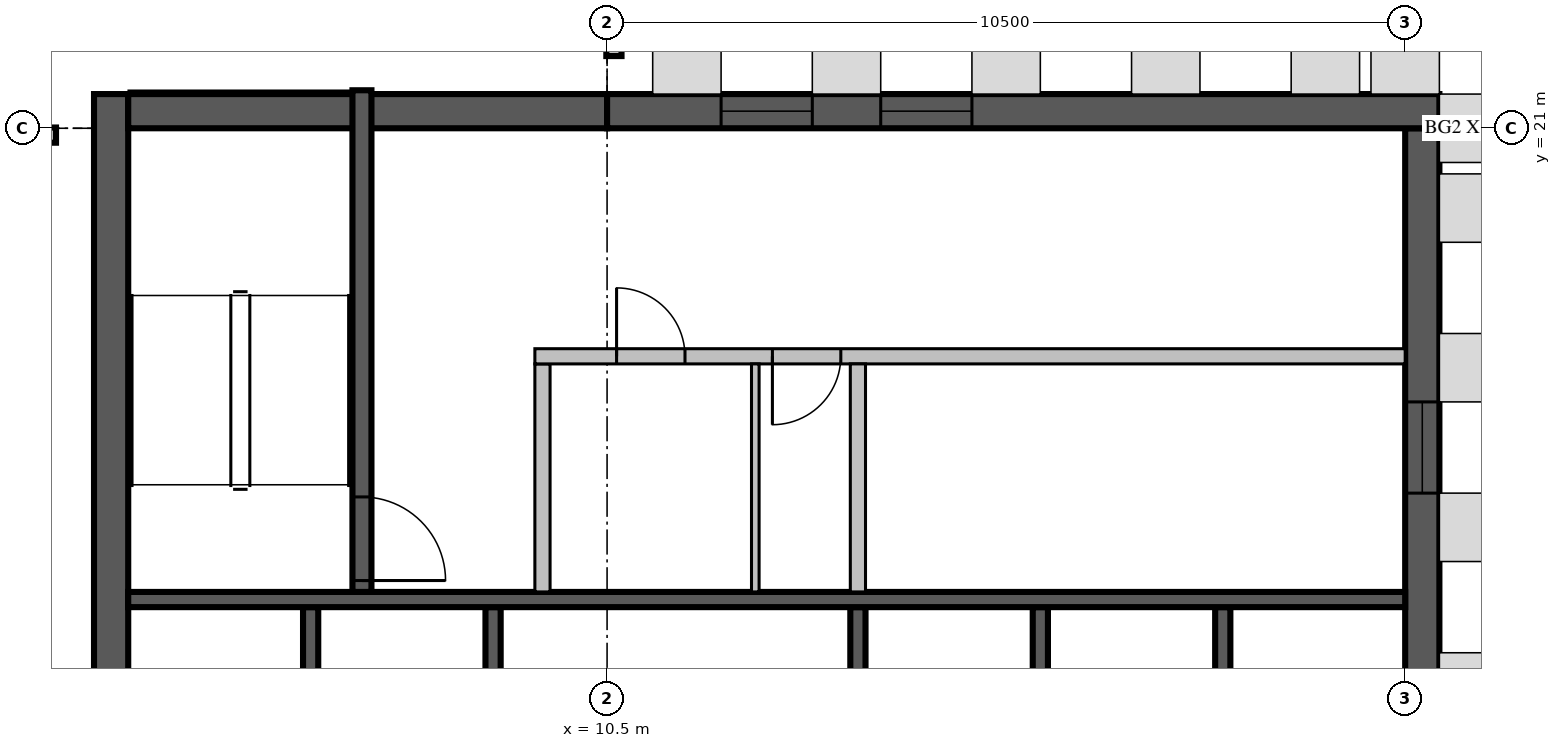
"""IFC4 building model, lengths in metres.
Left out: names, types, materials, properties, quantities, classifications, styles, units other than length and angle.
Written with IfcOpenShell. Run it as: python <this file> out.ifc"""

import sys

from ifc_helpers import new_model, si_unit, direction, frame, frame_2d, origin, place, context, subcontext, project, spatial, rectangle, extrude, source, transform, mapped, element, fill, save


model = new_model("IFC4")
c1 = context("Model", 3, precision=1e-05, world=origin(), true_north=direction((0.0, 1.0)))
c2 = subcontext(c1, "Body", "Model", "MODEL_VIEW")
j1 = project(units=[si_unit("LENGTHUNIT", "METRE"), si_unit("PLANEANGLEUNIT", "RADIAN")], contexts=[c1])
p1 = place(None, origin())
s1 = spatial("IfcSite", under=j1, at=p1, CompositionType="ELEMENT")
p2 = place(p1, origin())
s2 = spatial("IfcBuilding", under=s1, at=p2, CompositionType="ELEMENT")
p3 = place(p2, frame((0.0, 0.0, 368.5)))
s3 = spatial("IfcBuildingStorey", under=s2, at=p3, CompositionType="ELEMENT", Elevation=368.5)
p4 = place(p3, frame((3.975, 4.2, 0.0), z_axis=(0.0, 0.0, 1.0), x_axis=(0.0, 1.0, 0.0)))
e1 = element("IfcWall", 1, at=p4, inside=s3, PredefinedType="SHEAR", context=c2, shape_type="SweptSolid", body=[
    extrude(rectangle(XDim=17.25, YDim=0.45, at=frame_2d((8.625, 0.0))), origin(), (0.0, 0.0, 1.0), 4.0),
])
m1 = source(origin(), c2, "Body", "SweptSolid", [
    extrude(rectangle(XDim=6.3, YDim=0.45, at=frame_2d((3.15, 0.0))), origin(), (0.0, 0.0, 1.0), 4.0),
])
p5 = place(p3, frame((4.2, 21.225, 0.0), z_axis=(0.0, 0.0, 1.0), x_axis=(1.0, 0.0, 0.0)))
e2 = element("IfcWall", 2, at=p5, inside=s3, PredefinedType="SHEAR", context=c2, shape_type="MappedRepresentation", body=[
    mapped(m1, transform((0.0, 0.0, 0.0), scale=1.0)),
])
p6 = place(p3, frame((21.225, 10.5, 0.0), z_axis=(0.0, 0.0, 1.0), x_axis=(0.0, 1.0, 0.0)))
e3 = element("IfcWall", 3, at=p6, inside=s3, PredefinedType="SHEAR", context=c2, shape_type="SweptSolid", body=[
    extrude(rectangle(XDim=10.5, YDim=0.45, at=frame_2d((5.25, 0.0))), origin(), (0.0, 0.0, 1.0), 4.0),
])
p7 = place(p6, frame((5.7, 0.0, 0.6)))
e4 = element("IfcOpeningElement", 4, at=p7, cuts=e3, PredefinedType="OPENING", context=c2, shape_type="SweptSolid", body=[
    extrude(rectangle(XDim=1.2, YDim=2.4, at=frame_2d((0.6, 1.2))), frame((0.0, 0.235, 0.0), z_axis=(0.0, -1.0, 0.0), x_axis=(1.0, 0.0, 0.0)), (0.0, 0.0, 1.0), 0.47),
])
p8 = place(p3, frame((10.5, 21.225, 0.0), z_axis=(0.0, 0.0, 1.0), x_axis=(1.0, 0.0, 0.0)))
e5 = element("IfcWall", 5, at=p8, inside=s3, PredefinedType="SHEAR", context=c2, shape_type="SweptSolid", body=[
    extrude(rectangle(XDim=10.95, YDim=0.45, at=frame_2d((5.475, 0.0))), origin(), (0.0, 0.0, 1.0), 4.0),
])
m2 = source(origin(), c2, "Body", "SweptSolid", [
    extrude(rectangle(XDim=1.2, YDim=2.4, at=frame_2d((0.6, 1.2))), frame((0.0, 0.235, 0.0), z_axis=(0.0, -1.0, 0.0), x_axis=(1.0, 0.0, 0.0)), (0.0, 0.0, 1.0), 0.47),
])
p9 = place(p8, frame((1.5, 0.0, 0.6)))
e6 = element("IfcOpeningElement", 6, at=p9, cuts=e5, PredefinedType="OPENING", context=c2, shape_type="MappedRepresentation", body=[
    mapped(m2, transform((0.0, 0.0, 0.0), scale=1.0)),
])
p10 = place(p8, frame((3.6, 0.0, 0.6)))
e7 = element("IfcOpeningElement", 7, at=p10, cuts=e5, PredefinedType="OPENING", context=c2, shape_type="MappedRepresentation", body=[
    mapped(m2, transform((0.0, 0.0, 0.0), scale=1.0)),
])
m3 = source(origin(), c2, "Body", "SweptSolid", [
    extrude(rectangle(XDim=7.15, YDim=0.2, at=frame_2d((3.575, 0.0))), origin(), (0.0, 0.0, 1.0), 1.1),
])
for number, where, z_axis, x_axis in (
    (8, (10.59, 21.95, 0.0), (0.0, 0.0, 1.0), (0.0, 1.0, 0.0)),
    (9, (20.91, 29.1, 0.0), (0.0, 0.0, 1.0), (0.0, -1.0, 0.0)),
):
    element("IfcWall", number, at=place(p3, frame(where, z_axis=z_axis, x_axis=x_axis)), inside=s3, PredefinedType="PARAPET", context=c2, shape_type="MappedRepresentation", body=[
        mapped(m3, transform((0.0, 0.0, 0.0), scale=1.0)),
    ])
m4 = source(origin(), c2, "Body", "SweptSolid", [
    extrude(rectangle(XDim=3.16, YDim=0.2, at=frame_2d((1.58, 0.0))), origin(), (0.0, 0.0, 1.0), 1.1),
])
p11 = place(p3, frame((0.09, 20.91, 0.0), z_axis=(0.0, 0.0, 1.0), x_axis=(1.0, 0.0, 0.0)))
e10 = element("IfcWall", 10, at=p11, inside=s3, PredefinedType="PARAPET", context=c2, shape_type="MappedRepresentation", body=[
    mapped(m4, transform((0.0, 0.0, 0.0), scale=1.0)),
])
p12 = place(p3, frame((6.6, 11.7, 0.0), z_axis=(0.0, 0.0, 1.0), x_axis=(0.0, 1.0, 0.0)))
e11 = element("IfcWall", 11, at=p12, inside=s3, PredefinedType="SOLIDWALL", context=c2, shape_type="SweptSolid", body=[
    extrude(rectangle(XDim=3.0, YDim=0.2, at=frame_2d((1.5, 0.0))), origin(), (0.0, 0.0, 1.0), 3.55),
])
m5 = source(origin(), c2, "Body", "SweptSolid", [
    extrude(rectangle(XDim=3.0, YDim=0.2, at=frame_2d((1.5, 0.0))), origin(), (0.0, 0.0, 1.0), 3.55),
])
for number, where, z_axis, x_axis in (
    (12, (9.0, 11.7, 0.0), (0.0, 0.0, 1.0), (0.0, 1.0, 0.0)),
    (13, (13.8, 11.7, 0.0), (0.0, 0.0, 1.0), (0.0, 1.0, 0.0)),
    (14, (16.2, 11.7, 0.0), (0.0, 0.0, 1.0), (0.0, 1.0, 0.0)),
    (15, (18.6, 11.7, 0.0), (0.0, 0.0, 1.0), (0.0, 1.0, 0.0)),
):
    element("IfcWall", number, at=place(p3, frame(where, z_axis=z_axis, x_axis=x_axis)), inside=s3, PredefinedType="SOLIDWALL", context=c2, shape_type="MappedRepresentation", body=[
        mapped(m5, transform((0.0, 0.0, 0.0), scale=1.0)),
    ])
m6 = source(origin(), c2, "Body", "SweptSolid", [
    extrude(rectangle(XDim=16.8, YDim=0.2, at=frame_2d((8.4, 0.0))), origin(), (0.0, 0.0, 1.0), 3.55),
])
p13 = place(p3, frame((4.2, 14.8, 0.0), z_axis=(0.0, 0.0, 1.0), x_axis=(1.0, 0.0, 0.0)))
e16 = element("IfcWall", 16, at=p13, inside=s3, PredefinedType="SOLIDWALL", context=c2, shape_type="MappedRepresentation", body=[
    mapped(m6, transform((0.0, 0.0, 0.0), scale=1.0)),
])
p14 = place(p3, frame((7.275, 14.9, 0.0), z_axis=(0.0, 0.0, 1.0), x_axis=(0.0, 1.0, 0.0)))
e17 = element("IfcWall", 17, at=p14, inside=s3, PredefinedType="SOLIDWALL", context=c2, shape_type="SweptSolid", body=[
    extrude(rectangle(XDim=6.6, YDim=0.25, at=frame_2d((3.3, 0.0))), origin(), (0.0, 0.0, 1.0), 3.55),
])
m7 = source(origin(), c2, "Body", "SweptSolid", [
    extrude(rectangle(XDim=1.1, YDim=2.1, at=frame_2d((0.55, 1.05))), frame((0.0, 0.135, 0.0), z_axis=(0.0, -1.0, 0.0), x_axis=(1.0, 0.0, 0.0)), (0.0, 0.0, 1.0), 0.27),
])
p15 = place(p14, frame((0.15, 0.0, 0.0)))
e18 = element("IfcOpeningElement", 18, at=p15, cuts=e17, PredefinedType="OPENING", context=c2, shape_type="MappedRepresentation", body=[
    mapped(m7, transform((0.0, 0.0, 0.0), scale=1.0)),
])
p16 = place(p3, frame((9.65, 14.9, 0.0), z_axis=(0.0, 0.0, 1.0), x_axis=(0.0, 1.0, 0.0)))
e19 = element("IfcWall", 19, at=p16, inside=s3, PredefinedType="PARTITIONING", context=c2, shape_type="SweptSolid", body=[
    extrude(rectangle(XDim=3.0, YDim=0.2, at=frame_2d((1.5, 0.0))), origin(), (0.0, 0.0, 1.0), 3.55),
])
p17 = place(p3, frame((9.55, 18.0, 0.0), z_axis=(0.0, 0.0, 1.0), x_axis=(1.0, 0.0, 0.0)))
e20 = element("IfcWall", 20, at=p17, inside=s3, PredefinedType="PARTITIONING", context=c2, shape_type="SweptSolid", body=[
    extrude(rectangle(XDim=11.45, YDim=0.2, at=frame_2d((5.725, 0.0))), origin(), (0.0, 0.0, 1.0), 3.55),
])
m8 = source(origin(), c2, "Body", "SweptSolid", [
    extrude(rectangle(XDim=0.9, YDim=2.1, at=frame_2d((0.45, 1.05))), frame((0.0, 0.11, 0.0), z_axis=(0.0, -1.0, 0.0), x_axis=(1.0, 0.0, 0.0)), (0.0, 0.0, 1.0), 0.22),
])
p18 = place(p17, frame((1.075, 0.0, 0.0)))
e21 = element("IfcOpeningElement", 21, at=p18, cuts=e20, PredefinedType="OPENING", context=c2, shape_type="MappedRepresentation", body=[
    mapped(m8, transform((0.0, 0.0, 0.0), scale=1.0)),
])
p19 = place(p17, frame((3.125, 0.0, 0.0)))
e22 = element("IfcOpeningElement", 22, at=p19, cuts=e20, PredefinedType="OPENING", context=c2, shape_type="MappedRepresentation", body=[
    mapped(m8, transform((0.0, 0.0, 0.0), scale=1.0)),
])
m9 = source(origin(), c2, "Body", "SweptSolid", [
    extrude(rectangle(XDim=3.0, YDim=0.2, at=frame_2d((1.5, 0.0))), origin(), (0.0, 0.0, 1.0), 3.55),
])
p20 = place(p3, frame((13.8, 14.9, 0.0), z_axis=(0.0, 0.0, 1.0), x_axis=(0.0, 1.0, 0.0)))
e23 = element("IfcWall", 23, at=p20, inside=s3, PredefinedType="PARTITIONING", context=c2, shape_type="MappedRepresentation", body=[
    mapped(m9, transform((0.0, 0.0, 0.0), scale=1.0)),
])
p21 = place(p3, frame((12.45, 14.9, 0.0), z_axis=(0.0, 0.0, 1.0), x_axis=(0.0, 1.0, 0.0)))
e24 = element("IfcWall", 24, at=p21, inside=s3, PredefinedType="PARTITIONING", context=c2, shape_type="SweptSolid", body=[
    extrude(rectangle(XDim=3.0, YDim=0.1, at=frame_2d((1.5, 0.0))), origin(), (0.0, 0.0, 1.0), 3.55),
])
m10 = source(origin(), c2, "Body", "SweptSolid", [
    extrude(rectangle(XDim=1.1, YDim=2.1, at=frame_2d((0.55, 1.05))), frame((0.0, 0.025, 0.0), z_axis=(0.0, -1.0, 0.0), x_axis=(1.0, 0.0, 0.0)), (0.0, 0.0, 1.0), 0.05),
])
p22 = place(p15, origin())
e25 = element("IfcDoor", 25, at=p22, inside=s3, OperationType="SINGLE_SWING_RIGHT", PredefinedType="DOOR", context=c2, shape_type="MappedRepresentation", body=[
    mapped(m10, transform((0.0, 0.0, 0.0), scale=1.0)),
])
fill(e18, e25)
m11 = source(origin(), c2, "Body", "SweptSolid", [
    extrude(rectangle(XDim=0.9, YDim=2.1, at=frame_2d((0.45, 1.05))), frame((0.0, 0.025, 0.0), z_axis=(0.0, -1.0, 0.0), x_axis=(1.0, 0.0, 0.0)), (0.0, 0.0, 1.0), 0.05),
])
p23 = place(p18, origin())
e26 = element("IfcDoor", 26, at=p23, inside=s3, OperationType="SINGLE_SWING_LEFT", PredefinedType="DOOR", context=c2, shape_type="MappedRepresentation", body=[
    mapped(m11, transform((0.0, 0.0, 0.0), scale=1.0)),
])
fill(e21, e26)
p24 = place(p19, origin())
e27 = element("IfcDoor", 27, at=p24, inside=s3, OperationType="SINGLE_SWING_RIGHT", PredefinedType="DOOR", context=c2, shape_type="MappedRepresentation", body=[
    mapped(m11, transform((0.0, 0.0, 0.0), scale=1.0)),
])
fill(e22, e27)
m12 = source(origin(), c2, "Body", "SweptSolid", [
    extrude(rectangle(XDim=1.2, YDim=2.4, at=frame_2d((0.6, 1.2))), frame((0.0, 0.03, 0.0), z_axis=(0.0, -1.0, 0.0), x_axis=(1.0, 0.0, 0.0)), (0.0, 0.0, 1.0), 0.06),
])
p25 = place(p7, origin())
e28 = element("IfcWindow", 28, at=p25, inside=s3, PartitioningType="SINGLE_PANEL", PredefinedType="WINDOW", context=c2, shape_type="MappedRepresentation", body=[
    mapped(m12, transform((0.0, 0.0, 0.0), scale=1.0)),
])
fill(e4, e28)
p26 = place(p9, origin())
e29 = element("IfcWindow", 29, at=p26, inside=s3, PartitioningType="SINGLE_PANEL", PredefinedType="WINDOW", context=c2, shape_type="MappedRepresentation", body=[
    mapped(m12, transform((0.0, 0.0, 0.0), scale=1.0)),
])
fill(e6, e29)
p27 = place(p10, origin())
e30 = element("IfcWindow", 30, at=p27, inside=s3, PartitioningType="SINGLE_PANEL", PredefinedType="WINDOW", context=c2, shape_type="MappedRepresentation", body=[
    mapped(m12, transform((0.0, 0.0, 0.0), scale=1.0)),
])
fill(e7, e30)
save(model, sys.argv[1])
